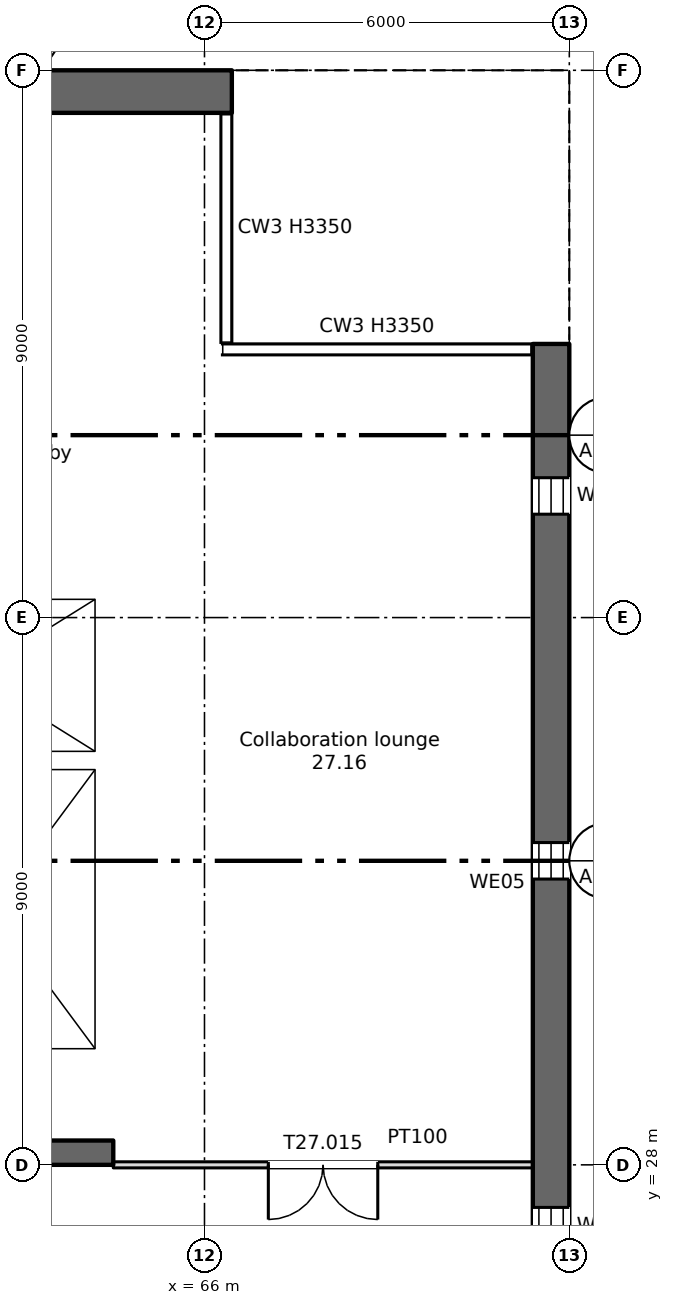
"""IFC4 building model, lengths in metres.
Left out: names, types, materials, properties, quantities, classifications, styles, units other than length and angle.
Written with IfcOpenShell. Run it as: python <this file> out.ifc"""

import sys

from ifc_helpers import new_model, si_unit, direction, frame, frame_2d, origin, place, context, subcontext, project, spatial, rectangle, extrude, element, fill, save


model = new_model("IFC4")
c1 = context("Model", 3, precision=1e-05, world=origin(), true_north=direction((0.0, 1.0)))
c2 = subcontext(c1, "Body", "Model", "MODEL_VIEW")
j1 = project(units=[si_unit("LENGTHUNIT", "METRE"), si_unit("PLANEANGLEUNIT", "RADIAN")], contexts=[c1])
p1 = place(None, origin())
s1 = spatial("IfcSite", under=j1, at=p1, CompositionType="ELEMENT")
p2 = place(p1, origin())
s2 = spatial("IfcBuilding", under=s1, at=p2, CompositionType="ELEMENT")
p3 = place(p2, frame((0.0, 0.0, 185.5)))
s3 = spatial("IfcBuildingStorey", under=s2, at=p3, CompositionType="ELEMENT", Elevation=185.5)
p4 = place(p3, frame((71.7, 7.5, 0.0), z_axis=(0.0, 0.0, 1.0), x_axis=(0.0, 1.0, 0.0)))
e1 = element("IfcWall", 1, at=p4, inside=s3, PredefinedType="SHEAR", context=c2, shape_type="SweptSolid", body=[
    extrude(rectangle(XDim=34.0, YDim=0.6, at=frame_2d((17.0, 0.0))), origin(), (0.0, 0.0, 1.0), 3.35),
])
p5 = place(p4, frame((1.2, 0.0, 0.6)))
e2 = element("IfcOpeningElement", 2, at=p5, cuts=e1, PredefinedType="OPENING", context=c2, shape_type="SweptSolid", body=[
    extrude(rectangle(XDim=0.6, YDim=2.4, at=frame_2d((0.3, 1.2))), frame((0.0, 0.31, 0.0), z_axis=(0.0, -1.0, 0.0), x_axis=(1.0, 0.0, 0.0)), (0.0, 0.0, 1.0), 0.62),
])
p6 = place(p4, frame((7.2, 0.0, 0.6)))
e3 = element("IfcOpeningElement", 3, at=p6, cuts=e1, PredefinedType="OPENING", context=c2, shape_type="SweptSolid", body=[
    extrude(rectangle(XDim=0.6, YDim=2.4, at=frame_2d((0.3, 1.2))), frame((0.0, 0.31, 0.0), z_axis=(0.0, -1.0, 0.0), x_axis=(1.0, 0.0, 0.0)), (0.0, 0.0, 1.0), 0.62),
])
p7 = place(p4, frame((13.2, 0.0, 0.6)))
e4 = element("IfcOpeningElement", 4, at=p7, cuts=e1, PredefinedType="OPENING", context=c2, shape_type="SweptSolid", body=[
    extrude(rectangle(XDim=0.6, YDim=2.4, at=frame_2d((0.3, 1.2))), frame((0.0, 0.31, 0.0), z_axis=(0.0, -1.0, 0.0), x_axis=(1.0, 0.0, 0.0)), (0.0, 0.0, 1.0), 0.62),
])
p8 = place(p4, frame((19.2, 0.0, 0.6)))
e5 = element("IfcOpeningElement", 5, at=p8, cuts=e1, PredefinedType="OPENING", context=c2, shape_type="SweptSolid", body=[
    extrude(rectangle(XDim=0.6, YDim=2.4, at=frame_2d((0.3, 1.2))), frame((0.0, 0.31, 0.0), z_axis=(0.0, -1.0, 0.0), x_axis=(1.0, 0.0, 0.0)), (0.0, 0.0, 1.0), 0.62),
])
p9 = place(p4, frame((25.2, 0.0, 0.6)))
e6 = element("IfcOpeningElement", 6, at=p9, cuts=e1, PredefinedType="OPENING", context=c2, shape_type="SweptSolid", body=[
    extrude(rectangle(XDim=0.6, YDim=2.4, at=frame_2d((0.3, 1.2))), frame((0.0, 0.31, 0.0), z_axis=(0.0, -1.0, 0.0), x_axis=(1.0, 0.0, 0.0)), (0.0, 0.0, 1.0), 0.62),
])
p10 = place(p4, frame((31.2, 0.0, 0.6)))
e7 = element("IfcOpeningElement", 7, at=p10, cuts=e1, PredefinedType="OPENING", context=c2, shape_type="SweptSolid", body=[
    extrude(rectangle(XDim=0.6, YDim=2.4, at=frame_2d((0.3, 1.2))), frame((0.0, 0.31, 0.0), z_axis=(0.0, -1.0, 0.0), x_axis=(1.0, 0.0, 0.0)), (0.0, 0.0, 1.0), 0.62),
])
p11 = place(p3, frame((11.55, 45.65, 0.0), z_axis=(0.0, 0.0, 1.0), x_axis=(1.0, 0.0, 0.0)))
e8 = element("IfcWall", 8, at=p11, inside=s3, PredefinedType="SHEAR", context=c2, shape_type="SweptSolid", body=[
    extrude(rectangle(XDim=54.9, YDim=0.7, at=frame_2d((27.45, 0.0))), origin(), (0.0, 0.0, 1.0), 3.35),
])
p12 = place(p11, frame((1.2, 0.0, 0.6)))
e9 = element("IfcOpeningElement", 9, at=p12, cuts=e8, PredefinedType="OPENING", context=c2, shape_type="SweptSolid", body=[
    extrude(rectangle(XDim=0.6, YDim=2.4, at=frame_2d((0.3, 1.2))), frame((0.0, 0.36, 0.0), z_axis=(0.0, -1.0, 0.0), x_axis=(1.0, 0.0, 0.0)), (0.0, 0.0, 1.0), 0.72),
])
p13 = place(p11, frame((49.2, 0.0, 0.6)))
e10 = element("IfcOpeningElement", 10, at=p13, cuts=e8, PredefinedType="OPENING", context=c2, shape_type="SweptSolid", body=[
    extrude(rectangle(XDim=0.6, YDim=2.4, at=frame_2d((0.3, 1.2))), frame((0.0, 0.36, 0.0), z_axis=(0.0, -1.0, 0.0), x_axis=(1.0, 0.0, 0.0)), (0.0, 0.0, 1.0), 0.72),
])
p14 = place(p3, frame((6.6, 28.2, 0.0), z_axis=(0.0, 0.0, 1.0), x_axis=(1.0, 0.0, 0.0)))
e11 = element("IfcWall", 11, at=p14, inside=s3, PredefinedType="SHEAR", context=c2, shape_type="SweptSolid", body=[
    extrude(rectangle(XDim=57.9, YDim=0.4, at=frame_2d((28.95, 0.0))), origin(), (0.0, 0.0, 1.0), 3.35),
])
p15 = place(p14, frame((12.913, 0.0, 0.0)))
e12 = element("IfcOpeningElement", 12, at=p15, cuts=e11, PredefinedType="OPENING", context=c2, shape_type="SweptSolid", body=[
    extrude(rectangle(XDim=0.9, YDim=2.1, at=frame_2d((0.45, 1.05))), frame((0.0, 0.21, 0.0), z_axis=(0.0, -1.0, 0.0), x_axis=(1.0, 0.0, 0.0)), (0.0, 0.0, 1.0), 0.42),
])
p16 = place(p14, frame((15.488, 0.0, 0.0)))
e13 = element("IfcOpeningElement", 13, at=p16, cuts=e11, PredefinedType="OPENING", context=c2, shape_type="SweptSolid", body=[
    extrude(rectangle(XDim=0.9, YDim=2.1, at=frame_2d((0.45, 1.05))), frame((0.0, 0.21, 0.0), z_axis=(0.0, -1.0, 0.0), x_axis=(1.0, 0.0, 0.0)), (0.0, 0.0, 1.0), 0.42),
])
p17 = place(p14, frame((48.413, 0.0, 0.0)))
e14 = element("IfcOpeningElement", 14, at=p17, cuts=e11, PredefinedType="OPENING", context=c2, shape_type="SweptSolid", body=[
    extrude(rectangle(XDim=0.9, YDim=2.1, at=frame_2d((0.45, 1.05))), frame((0.0, 0.21, 0.0), z_axis=(0.0, -1.0, 0.0), x_axis=(1.0, 0.0, 0.0)), (0.0, 0.0, 1.0), 0.42),
])
p18 = place(p14, frame((50.988, 0.0, 0.0)))
e15 = element("IfcOpeningElement", 15, at=p18, cuts=e11, PredefinedType="OPENING", context=c2, shape_type="SweptSolid", body=[
    extrude(rectangle(XDim=0.9, YDim=2.1, at=frame_2d((0.45, 1.05))), frame((0.0, 0.21, 0.0), z_axis=(0.0, -1.0, 0.0), x_axis=(1.0, 0.0, 0.0)), (0.0, 0.0, 1.0), 0.42),
])
p19 = place(p14, frame((0.663, 0.0, 0.0)))
e16 = element("IfcOpeningElement", 16, at=p19, cuts=e11, PredefinedType="OPENING", context=c2, shape_type="SweptSolid", body=[
    extrude(rectangle(XDim=0.9, YDim=2.1, at=frame_2d((0.45, 1.05))), frame((0.0, 0.21, 0.0), z_axis=(0.0, -1.0, 0.0), x_axis=(1.0, 0.0, 0.0)), (0.0, 0.0, 1.0), 0.42),
])
p20 = place(p14, frame((2.238, 0.0, 0.0)))
e17 = element("IfcOpeningElement", 17, at=p20, cuts=e11, PredefinedType="OPENING", context=c2, shape_type="SweptSolid", body=[
    extrude(rectangle(XDim=0.9, YDim=2.1, at=frame_2d((0.45, 1.05))), frame((0.0, 0.21, 0.0), z_axis=(0.0, -1.0, 0.0), x_axis=(1.0, 0.0, 0.0)), (0.0, 0.0, 1.0), 0.42),
])
p21 = place(p14, frame((4.8, 0.0, 0.0)))
e18 = element("IfcOpeningElement", 18, at=p21, cuts=e11, PredefinedType="OPENING", context=c2, shape_type="SweptSolid", body=[
    extrude(rectangle(XDim=1.2, YDim=2.1, at=frame_2d((0.6, 1.05))), frame((0.0, 0.21, 0.0), z_axis=(0.0, -1.0, 0.0), x_axis=(1.0, 0.0, 0.0)), (0.0, 0.0, 1.0), 0.42),
])
p22 = place(p14, frame((31.8, 0.0, 0.0)))
e19 = element("IfcOpeningElement", 19, at=p22, cuts=e11, PredefinedType="OPENING", context=c2, shape_type="SweptSolid", body=[
    extrude(rectangle(XDim=1.2, YDim=2.1, at=frame_2d((0.6, 1.05))), frame((0.0, 0.21, 0.0), z_axis=(0.0, -1.0, 0.0), x_axis=(1.0, 0.0, 0.0)), (0.0, 0.0, 1.0), 0.42),
])
p23 = place(p14, frame((55.3, 0.0, 0.0)))
e20 = element("IfcOpeningElement", 20, at=p23, cuts=e11, PredefinedType="OPENING", context=c2, shape_type="SweptSolid", body=[
    extrude(rectangle(XDim=1.2, YDim=2.1, at=frame_2d((0.6, 1.05))), frame((0.0, 0.21, 0.0), z_axis=(0.0, -1.0, 0.0), x_axis=(1.0, 0.0, 0.0)), (0.0, 0.0, 1.0), 0.42),
])
p24 = place(p14, frame((21.8, 0.0, 0.0)))
e21 = element("IfcOpeningElement", 21, at=p24, cuts=e11, PredefinedType="OPENING", context=c2, shape_type="SweptSolid", body=[
    extrude(rectangle(XDim=1.2, YDim=2.1, at=frame_2d((0.6, 1.05))), frame((0.0, 0.21, 0.0), z_axis=(0.0, -1.0, 0.0), x_axis=(1.0, 0.0, 0.0)), (0.0, 0.0, 1.0), 0.42),
])
p25 = place(p14, frame((41.8, 0.0, 0.0)))
e22 = element("IfcOpeningElement", 22, at=p25, cuts=e11, PredefinedType="OPENING", context=c2, shape_type="SweptSolid", body=[
    extrude(rectangle(XDim=1.2, YDim=2.1, at=frame_2d((0.6, 1.05))), frame((0.0, 0.21, 0.0), z_axis=(0.0, -1.0, 0.0), x_axis=(1.0, 0.0, 0.0)), (0.0, 0.0, 1.0), 0.42),
])
p26 = place(p14, frame((24.95, 0.0, 0.0)))
e23 = element("IfcOpeningElement", 23, at=p26, cuts=e11, PredefinedType="OPENING", context=c2, shape_type="SweptSolid", body=[
    extrude(rectangle(XDim=2.4, YDim=2.1, at=frame_2d((1.2, 1.05))), frame((0.0, 0.21, 0.0), z_axis=(0.0, -1.0, 0.0), x_axis=(1.0, 0.0, 0.0)), (0.0, 0.0, 1.0), 0.42),
])
p27 = place(p14, frame((37.45, 0.0, 0.0)))
e24 = element("IfcOpeningElement", 24, at=p27, cuts=e11, PredefinedType="OPENING", context=c2, shape_type="SweptSolid", body=[
    extrude(rectangle(XDim=2.4, YDim=2.1, at=frame_2d((1.2, 1.05))), frame((0.0, 0.21, 0.0), z_axis=(0.0, -1.0, 0.0), x_axis=(1.0, 0.0, 0.0)), (0.0, 0.0, 1.0), 0.42),
])
p28 = place(p14, frame((8.1, 0.0, 0.0)))
e25 = element("IfcOpeningElement", 25, at=p28, cuts=e11, PredefinedType="OPENING", context=c2, shape_type="SweptSolid", body=[
    extrude(rectangle(XDim=2.4, YDim=2.1, at=frame_2d((1.2, 1.05))), frame((0.0, 0.21, 0.0), z_axis=(0.0, -1.0, 0.0), x_axis=(1.0, 0.0, 0.0)), (0.0, 0.0, 1.0), 0.42),
])
p29 = place(p14, frame((28.95, 0.0, 0.0)))
e26 = element("IfcOpeningElement", 26, at=p29, cuts=e11, PredefinedType="OPENING", context=c2, shape_type="SweptSolid", body=[
    extrude(rectangle(XDim=0.9, YDim=2.1, at=frame_2d((0.45, 1.05))), frame((0.0, 0.21, 0.0), z_axis=(0.0, -1.0, 0.0), x_axis=(1.0, 0.0, 0.0)), (0.0, 0.0, 1.0), 0.42),
])
p30 = place(p14, frame((34.95, 0.0, 0.0)))
e27 = element("IfcOpeningElement", 27, at=p30, cuts=e11, PredefinedType="OPENING", context=c2, shape_type="SweptSolid", body=[
    extrude(rectangle(XDim=0.9, YDim=2.1, at=frame_2d((0.45, 1.05))), frame((0.0, 0.21, 0.0), z_axis=(0.0, -1.0, 0.0), x_axis=(1.0, 0.0, 0.0)), (0.0, 0.0, 1.0), 0.42),
])
p31 = place(p3, frame((64.35, 34.8, 0.0), z_axis=(0.0, 0.0, 1.0), x_axis=(0.0, 1.0, 0.0)))
e28 = element("IfcWall", 28, at=p31, inside=s3, PredefinedType="SHEAR", context=c2, shape_type="SweptSolid", body=[
    extrude(rectangle(XDim=10.5, YDim=0.3, at=frame_2d((5.25, 0.0))), origin(), (0.0, 0.0, 1.0), 3.35),
])
p32 = place(p3, frame((64.35, 28.4, 0.0), z_axis=(0.0, 0.0, 1.0), x_axis=(0.0, 1.0, 0.0)))
e29 = element("IfcWall", 29, at=p32, inside=s3, PredefinedType="SHEAR", context=c2, shape_type="SweptSolid", body=[
    extrude(rectangle(XDim=6.1, YDim=0.3, at=frame_2d((3.05, 0.0))), origin(), (0.0, 0.0, 1.0), 3.35),
])
p33 = place(p3, frame((60.2, 34.65, 0.0), z_axis=(0.0, 0.0, 1.0), x_axis=(1.0, 0.0, 0.0)))
e30 = element("IfcWall", 30, at=p33, inside=s3, PredefinedType="SHEAR", context=c2, shape_type="SweptSolid", body=[
    extrude(rectangle(XDim=4.3, YDim=0.3, at=frame_2d((2.15, 0.0))), origin(), (0.0, 0.0, 1.0), 3.35),
])
p34 = place(p3, frame((60.2, 37.45, 0.0), z_axis=(0.0, 0.0, 1.0), x_axis=(1.0, 0.0, 0.0)))
e31 = element("IfcWall", 31, at=p34, inside=s3, PredefinedType="SHEAR", context=c2, shape_type="SweptSolid", body=[
    extrude(rectangle(XDim=4.0, YDim=0.3, at=frame_2d((2.0, 0.0))), origin(), (0.0, 0.0, 1.0), 3.35),
])
p35 = place(p34, frame((1.45, 0.0, 0.0)))
e32 = element("IfcOpeningElement", 32, at=p35, cuts=e31, PredefinedType="OPENING", context=c2, shape_type="SweptSolid", body=[
    extrude(rectangle(XDim=1.1, YDim=2.1, at=frame_2d((0.55, 1.05))), frame((0.0, 0.16, 0.0), z_axis=(0.0, -1.0, 0.0), x_axis=(1.0, 0.0, 0.0)), (0.0, 0.0, 1.0), 0.32),
])
p36 = place(p3, frame((64.5, 28.0, 0.0), z_axis=(0.0, 0.0, 1.0), x_axis=(1.0, 0.0, 0.0)))
e33 = element("IfcWall", 33, at=p36, inside=s3, PredefinedType="PARTITIONING", context=c2, shape_type="SweptSolid", body=[
    extrude(rectangle(XDim=6.9, YDim=0.1, at=frame_2d((3.45, 0.0))), origin(), (0.0, 0.0, 1.0), 3.35),
])
p37 = place(p36, frame((2.55, 0.0, 0.0)))
e34 = element("IfcOpeningElement", 34, at=p37, cuts=e33, PredefinedType="OPENING", context=c2, shape_type="SweptSolid", body=[
    extrude(rectangle(XDim=1.8, YDim=2.1, at=frame_2d((0.9, 1.05))), frame((0.0, 0.06, 0.0), z_axis=(0.0, -1.0, 0.0), x_axis=(1.0, 0.0, 0.0)), (0.0, 0.0, 1.0), 0.12),
])
p38 = place(p8, origin())
e35 = element("IfcWindow", 35, at=p38, inside=s3, PartitioningType="SINGLE_PANEL", PredefinedType="WINDOW", context=c2, shape_type="SweptSolid", body=[
    extrude(rectangle(XDim=0.6, YDim=2.4, at=frame_2d((0.3, 1.2))), frame((0.0, 0.03, 0.0), z_axis=(0.0, -1.0, 0.0), x_axis=(1.0, 0.0, 0.0)), (0.0, 0.0, 1.0), 0.06),
])
fill(e5, e35)
p39 = place(p9, origin())
e36 = element("IfcWindow", 36, at=p39, inside=s3, PartitioningType="SINGLE_PANEL", PredefinedType="WINDOW", context=c2, shape_type="SweptSolid", body=[
    extrude(rectangle(XDim=0.6, YDim=2.4, at=frame_2d((0.3, 1.2))), frame((0.0, 0.03, 0.0), z_axis=(0.0, -1.0, 0.0), x_axis=(1.0, 0.0, 0.0)), (0.0, 0.0, 1.0), 0.06),
])
fill(e6, e36)
p40 = place(p10, origin())
e37 = element("IfcWindow", 37, at=p40, inside=s3, PartitioningType="SINGLE_PANEL", PredefinedType="WINDOW", context=c2, shape_type="SweptSolid", body=[
    extrude(rectangle(XDim=0.6, YDim=2.4, at=frame_2d((0.3, 1.2))), frame((0.0, 0.03, 0.0), z_axis=(0.0, -1.0, 0.0), x_axis=(1.0, 0.0, 0.0)), (0.0, 0.0, 1.0), 0.06),
])
fill(e7, e37)
p41 = place(p37, origin())
e38 = element("IfcDoor", 38, at=p41, inside=s3, OperationType="DOUBLE_DOOR_SINGLE_SWING", PredefinedType="DOOR", context=c2, shape_type="SweptSolid", body=[
    extrude(rectangle(XDim=1.8, YDim=2.1, at=frame_2d((0.9, 1.05))), frame((0.0, 0.025, 0.0), z_axis=(0.0, -1.0, 0.0), x_axis=(1.0, 0.0, 0.0)), (0.0, 0.0, 1.0), 0.05),
])
fill(e34, e38)
save(model, sys.argv[1])
